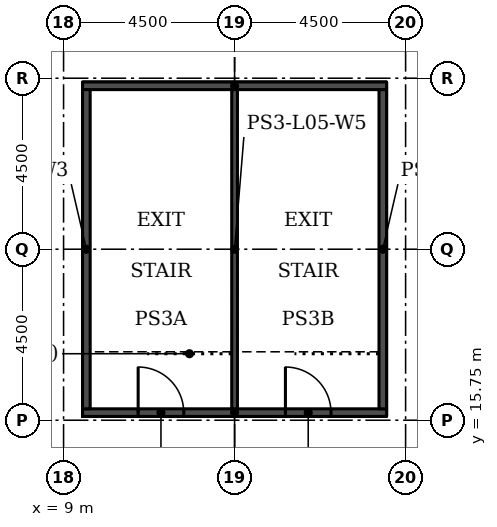
"""IFC4 building model, lengths in metres.
Left out: names, types, materials, properties, quantities, classifications, styles, units other than length and angle.
Written with IfcOpenShell. Run it as: python <this file> out.ifc"""

import sys

from ifc_helpers import new_model, si_unit, direction, frame, frame_2d, origin, place, context, subcontext, project, spatial, rectangle, extrude, element, fill, save


model = new_model("IFC4")
c1 = context("Model", 3, precision=1e-05, world=origin(), true_north=direction((0.0, 1.0)))
c2 = subcontext(c1, "Body", "Model", "MODEL_VIEW")
j1 = project(units=[si_unit("LENGTHUNIT", "METRE"), si_unit("PLANEANGLEUNIT", "RADIAN")], contexts=[c1])
p1 = place(None, origin())
s1 = spatial("IfcSite", under=j1, at=p1, CompositionType="ELEMENT")
p2 = place(p1, origin())
s2 = spatial("IfcBuilding", under=s1, at=p2, CompositionType="ELEMENT")
p3 = place(p2, frame((0.0, 0.0, 28.5)))
s3 = spatial("IfcBuildingStorey", under=s2, at=p3, CompositionType="ELEMENT", Elevation=28.5)
p4 = place(p3, frame((9.5, 15.95, 0.0)))
e1 = element("IfcWall", 1, at=p4, inside=s3, PredefinedType="SHEAR", context=c2, shape_type="SweptSolid", body=[
    extrude(rectangle(XDim=8.0, YDim=0.2, at=frame_2d((4.0, 0.0))), origin(), (0.0, 0.0, 1.0), 2.8),
])
p5 = place(p4, frame((1.462, 0.0, 0.0)))
e2 = element("IfcOpeningElement", 2, at=p5, cuts=e1, PredefinedType="OPENING", context=c2, shape_type="SweptSolid", body=[
    extrude(rectangle(XDim=1.2, YDim=2.4, at=frame_2d((0.6, 1.2))), frame((0.0, 0.11, 0.0), z_axis=(0.0, -1.0, 0.0), x_axis=(1.0, 0.0, 0.0)), (0.0, 0.0, 1.0), 0.22),
])
p6 = place(p4, frame((5.337, 0.0, 0.0)))
e3 = element("IfcOpeningElement", 3, at=p6, cuts=e1, PredefinedType="OPENING", context=c2, shape_type="SweptSolid", body=[
    extrude(rectangle(XDim=1.2, YDim=2.4, at=frame_2d((0.6, 1.2))), frame((0.0, 0.11, 0.0), z_axis=(0.0, -1.0, 0.0), x_axis=(1.0, 0.0, 0.0)), (0.0, 0.0, 1.0), 0.22),
])
p7 = place(p3, frame((9.5, 24.55, 0.0)))
e4 = element("IfcWall", 4, at=p7, inside=s3, PredefinedType="SHEAR", context=c2, shape_type="SweptSolid", body=[
    extrude(rectangle(XDim=8.0, YDim=0.2, at=frame_2d((4.0, 0.0))), origin(), (0.0, 0.0, 1.0), 2.8),
])
for number, where, z_axis, x_axis in (
    (5, (9.6, 16.05, 0.0), (0.0, 0.0, 1.0), (0.0, 1.0, 0.0)),
    (6, (17.4, 16.05, 0.0), (0.0, 0.0, 1.0), (0.0, 1.0, 0.0)),
):
    element("IfcWall", number, at=place(p3, frame(where, z_axis=z_axis, x_axis=x_axis)), inside=s3, PredefinedType="SHEAR", context=c2, shape_type="SweptSolid", body=[
        extrude(rectangle(XDim=8.4, YDim=0.2, at=frame_2d((4.2, 0.0))), origin(), (0.0, 0.0, 1.0), 2.8),
    ])
p8 = place(p3, frame((13.5, 16.05, 0.0), z_axis=(0.0, 0.0, 1.0), x_axis=(0.0, 1.0, 0.0)))
e7 = element("IfcWall", 7, at=p8, inside=s3, PredefinedType="SHEAR", context=c2, shape_type="SweptSolid", body=[
    extrude(rectangle(XDim=8.4, YDim=0.15, at=frame_2d((4.2, 0.0))), origin(), (0.0, 0.0, 1.0), 2.8),
])
p9 = place(p5, origin())
e8 = element("IfcDoor", 8, at=p9, inside=s3, OperationType="SINGLE_SWING_LEFT", PredefinedType="DOOR", context=c2, shape_type="SweptSolid", body=[
    extrude(rectangle(XDim=1.2, YDim=2.4, at=frame_2d((0.6, 1.2))), frame((0.0, 0.025, 0.0), z_axis=(0.0, -1.0, 0.0), x_axis=(1.0, 0.0, 0.0)), (0.0, 0.0, 1.0), 0.05),
])
fill(e2, e8)
p10 = place(p6, origin())
e9 = element("IfcDoor", 9, at=p10, inside=s3, OperationType="SINGLE_SWING_RIGHT", PredefinedType="DOOR", context=c2, shape_type="SweptSolid", body=[
    extrude(rectangle(XDim=1.2, YDim=2.4, at=frame_2d((0.6, 1.2))), frame((0.0, 0.025, 0.0), z_axis=(0.0, -1.0, 0.0), x_axis=(1.0, 0.0, 0.0)), (0.0, 0.0, 1.0), 0.05),
])
fill(e3, e9)
save(model, sys.argv[1])
